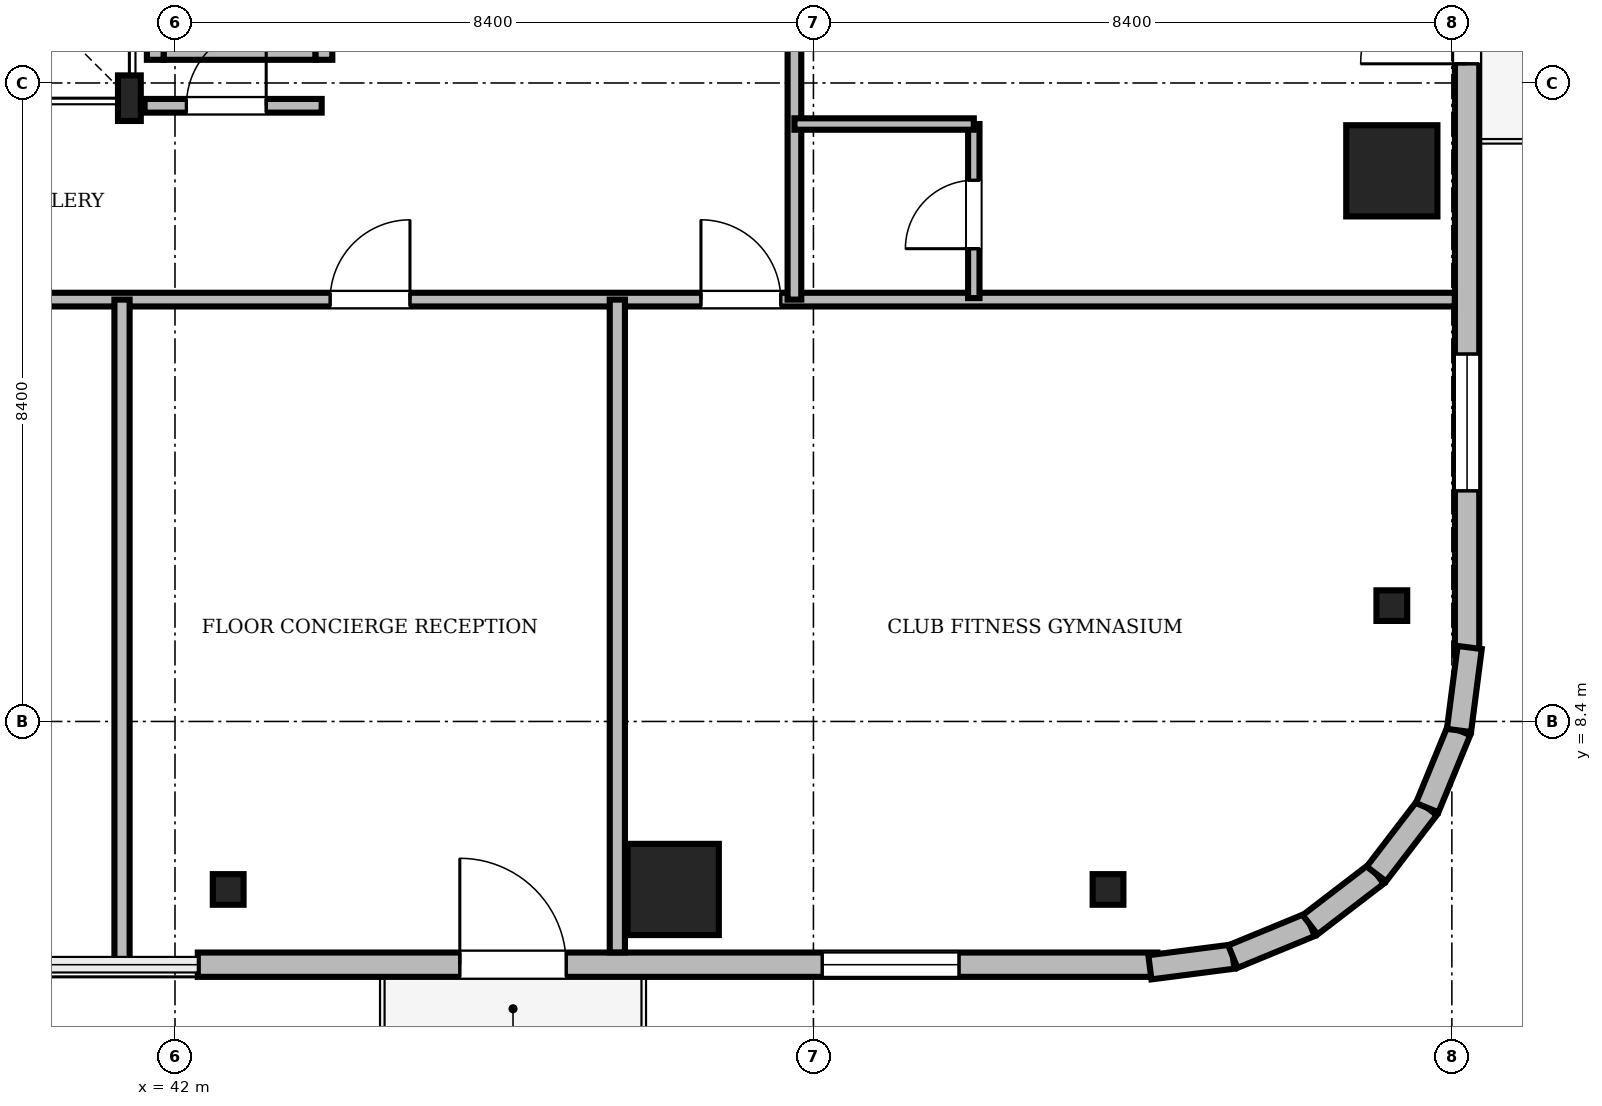
"""IFC4 building model, lengths in metres.
Left out: names, types, materials, properties, quantities, classifications, styles, units other than length and angle.
Written with IfcOpenShell. Run it as: python <this file> out.ifc"""

import sys

from ifc_helpers import new_model, si_unit, direction, frame, frame_2d, origin, origin_2d, place, context, subcontext, project, spatial, rectangle, i_section, extrude, source, transform, mapped, element, fill, save


model = new_model("IFC4")
c1 = context("Model", 3, precision=1e-05, world=origin(), true_north=direction((0.0, 1.0)))
c2 = subcontext(c1, "Body", "Model", "MODEL_VIEW")
j1 = project(units=[si_unit("LENGTHUNIT", "METRE"), si_unit("PLANEANGLEUNIT", "RADIAN")], contexts=[c1])
p1 = place(None, origin())
s1 = spatial("IfcSite", under=j1, at=p1, CompositionType="ELEMENT")
p2 = place(p1, origin())
s2 = spatial("IfcBuilding", under=s1, at=p2, CompositionType="ELEMENT")
p3 = place(p2, frame((0.0, 0.0, 278.25)))
s3 = spatial("IfcBuildingStorey", under=s2, at=p3, CompositionType="ELEMENT", Elevation=278.25)
m1 = source(origin(), c2, "Body", "SweptSolid", [
    extrude(i_section(OverallWidth=0.3, OverallDepth=0.6, WebThickness=0.015, FlangeThickness=0.03, FilletRadius=0.027, at=origin_2d()), origin(), (0.0, 0.0, 1.0), 3.3),
])
p4 = place(p3, frame((41.4, 16.6, 0.0), z_axis=(0.0, 0.0, 1.0), x_axis=(1.0, 0.0, 0.0)))
e1 = element("IfcColumn", 1, at=p4, inside=s3, PredefinedType="COLUMN", context=c2, shape_type="MappedRepresentation", body=[
    mapped(m1, transform((0.0, 0.0, 0.0), scale=1.0)),
])
m2 = source(origin(), c2, "Body", "SweptSolid", [
    extrude(rectangle(XDim=1.2, YDim=1.2, at=origin_2d()), origin(), (0.0, 0.0, 1.0), 3.354),
])
for number, where, z_axis, x_axis in (
    (2, (48.556, 6.19, 0.0), (-0.076, 0.161, 0.984), (-0.904, -0.428, 0.0)),
    (3, (58.01, 15.644, 0.0), (-0.161, 0.076, 0.984), (-0.428, -0.904, 0.0)),
):
    element("IfcColumn", number, at=place(p3, frame(where, z_axis=z_axis, x_axis=x_axis)), inside=s3, PredefinedType="COLUMN", context=c2, shape_type="MappedRepresentation", body=[
        mapped(m2, transform((0.0, 0.0, 0.0), scale=1.0)),
    ])
m3 = source(origin(), c2, "Body", "SweptSolid", [
    extrude(i_section(OverallWidth=0.405, OverallDepth=0.403, WebThickness=0.018, FlangeThickness=0.028, FilletRadius=0.015, at=origin_2d()), origin(), (0.0, 0.0, 1.0), 3.344),
])
p5 = place(p3, frame((42.7, 6.19, 0.0), z_axis=(0.0, 0.161497617931, 0.986873101975), x_axis=(-1.0, 0.0, 0.0)))
e4 = element("IfcColumn", 4, at=p5, inside=s3, PredefinedType="COLUMN", context=c2, shape_type="MappedRepresentation", body=[
    mapped(m3, transform((0.0, 0.0, 0.0), scale=1.0)),
])
m4 = source(origin(), c2, "Body", "SweptSolid", [
    extrude(i_section(OverallWidth=0.405, OverallDepth=0.403, WebThickness=0.018, FlangeThickness=0.028, FilletRadius=0.015, at=origin_2d()), origin(), (0.0, 0.0, 1.0), 3.371),
])
p6 = place(p3, frame((54.276, 6.19, 0.0), z_axis=(-0.126309254806, 0.160204169513, 0.97896914978), x_axis=(-0.785282442908, -0.619137694589, 0.0)))
e5 = element("IfcColumn", 5, at=p6, inside=s3, PredefinedType="COLUMN", context=c2, shape_type="MappedRepresentation", body=[
    mapped(m4, transform((0.0, 0.0, 0.0), scale=1.0)),
])
m5 = source(origin(), c2, "Body", "SweptSolid", [
    extrude(i_section(OverallWidth=0.405, OverallDepth=0.403, WebThickness=0.018, FlangeThickness=0.028, FilletRadius=0.015, at=origin_2d()), origin(), (0.0, 0.0, 1.0), 3.371),
])
p7 = place(p3, frame((58.01, 9.924, 0.0), z_axis=(-0.160202703573, 0.126380523389, 0.978960191773), x_axis=(-0.619356546002, -0.785109845133, 0.0)))
e6 = element("IfcColumn", 6, at=p7, inside=s3, PredefinedType="COLUMN", context=c2, shape_type="MappedRepresentation", body=[
    mapped(m5, transform((0.0, 0.0, 0.0), scale=1.0)),
])
m6 = source(origin(), c2, "Body", "SweptSolid", [
    extrude(rectangle(XDim=12.626, YDim=0.32, at=frame_2d((6.313, 0.0))), origin(), (0.0, 0.0, 1.0), 3.3),
])
p8 = place(p3, frame((42.3, 5.2, 0.0), z_axis=(0.0, 0.0, 1.0), x_axis=(1.0, 0.0, 0.0)))
e7 = element("IfcWall", 7, at=p8, inside=s3, PredefinedType="SOLIDWALL", context=c2, shape_type="MappedRepresentation", body=[
    mapped(m6, transform((0.0, 0.0, 0.0), scale=1.0)),
])
m7 = source(origin(), c2, "Body", "SweptSolid", [
    extrude(rectangle(XDim=1.4, YDim=2.3, at=frame_2d((0.7, 1.15))), frame((0.0, 0.17, 0.0), z_axis=(0.0, -1.0, 0.0), x_axis=(1.0, 0.0, 0.0)), (0.0, 0.0, 1.0), 0.34),
])
p9 = place(p8, frame((3.448, 0.0, 0.0)))
e8 = element("IfcOpeningElement", 8, at=p9, cuts=e7, PredefinedType="OPENING", context=c2, shape_type="MappedRepresentation", body=[
    mapped(m7, transform((0.0, 0.0, 0.0), scale=1.0)),
])
m8 = source(origin(), c2, "Body", "SweptSolid", [
    extrude(rectangle(XDim=1.8, YDim=2.4, at=frame_2d((0.9, 1.2))), frame((0.0, 0.17, 0.0), z_axis=(0.0, -1.0, 0.0), x_axis=(1.0, 0.0, 0.0)), (0.0, 0.0, 1.0), 0.34),
])
p10 = place(p8, frame((8.216, 0.0, 0.64)))
e9 = element("IfcOpeningElement", 9, at=p10, cuts=e7, PredefinedType="OPENING", context=c2, shape_type="MappedRepresentation", body=[
    mapped(m8, transform((0.0, 0.0, 0.0), scale=1.0)),
])
p11 = place(p3, frame((59.0, 9.274, 0.0), z_axis=(0.0, 0.0, 1.0), x_axis=(0.0, 1.0, 0.0)))
e10 = element("IfcWall", 10, at=p11, inside=s3, PredefinedType="SOLIDWALL", context=c2, shape_type="MappedRepresentation", body=[
    mapped(m6, transform((0.0, 0.0, 0.0), scale=1.0)),
])
p12 = place(p11, frame((7.778, 0.0, 0.0)))
e11 = element("IfcOpeningElement", 11, at=p12, cuts=e10, PredefinedType="OPENING", context=c2, shape_type="MappedRepresentation", body=[
    mapped(m7, transform((0.0, 0.0, 0.0), scale=1.0)),
])
p13 = place(p11, frame((2.16, 0.0, 0.64)))
e12 = element("IfcOpeningElement", 12, at=p13, cuts=e10, PredefinedType="OPENING", context=c2, shape_type="MappedRepresentation", body=[
    mapped(m8, transform((0.0, 0.0, 0.0), scale=1.0)),
])
m9 = source(origin(), c2, "Body", "SweptSolid", [
    extrude(rectangle(XDim=1.1, YDim=0.32, at=frame_2d((0.55, 0.0))), origin(), (0.0, 0.0, 1.0), 3.3),
])
p14 = place(p3, frame((54.827, 5.166, 0.0), z_axis=(0.0, 0.0, 1.0), x_axis=(0.991799654079, 0.127802371532, 0.0)))
e13 = element("IfcWall", 13, at=p14, inside=s3, PredefinedType="SOLIDWALL", context=c2, shape_type="MappedRepresentation", body=[
    mapped(m9, transform((0.0, 0.0, 0.0), scale=1.0)),
])
m10 = source(origin(), c2, "Body", "SweptSolid", [
    extrude(rectangle(XDim=1.099, YDim=0.32, at=frame_2d((0.55, 0.0))), origin(), (0.0, 0.0, 1.0), 3.3),
])
p15 = place(p3, frame((55.918, 5.306, 0.0), z_axis=(0.0, 0.0, 1.0), x_axis=(0.924613688598, 0.380906191676, 0.0)))
e14 = element("IfcWall", 14, at=p15, inside=s3, PredefinedType="SOLIDWALL", context=c2, shape_type="MappedRepresentation", body=[
    mapped(m10, transform((0.0, 0.0, 0.0), scale=1.0)),
])
m11 = source(origin(), c2, "Body", "SweptSolid", [
    extrude(rectangle(XDim=1.099, YDim=0.32, at=frame_2d((0.549, 0.0))), origin(), (0.0, 0.0, 1.0), 3.3),
])
for number, where, z_axis, x_axis in (
    (15, (56.935, 5.725, 0.0), (0.0, 0.0, 1.0), (0.794, 0.608, 0.0)),
    (16, (57.807, 6.393, 0.0), (0.0, 0.0, 1.0), (0.608, 0.794, 0.0)),
):
    element("IfcWall", number, at=place(p3, frame(where, z_axis=z_axis, x_axis=x_axis)), inside=s3, PredefinedType="SOLIDWALL", context=c2, shape_type="MappedRepresentation", body=[
        mapped(m11, transform((0.0, 0.0, 0.0), scale=1.0)),
    ])
p16 = place(p3, frame((58.475, 7.265, 0.0), z_axis=(0.0, 0.0, 1.0), x_axis=(0.380906191676, 0.924613688598, 0.0)))
e17 = element("IfcWall", 17, at=p16, inside=s3, PredefinedType="SOLIDWALL", context=c2, shape_type="MappedRepresentation", body=[
    mapped(m10, transform((0.0, 0.0, 0.0), scale=1.0)),
])
m12 = source(origin(), c2, "Body", "SweptSolid", [
    extrude(rectangle(XDim=1.101, YDim=0.32, at=frame_2d((0.55, 0.0))), origin(), (0.0, 0.0, 1.0), 3.3),
])
p17 = place(p3, frame((58.894, 8.282, 0.0), z_axis=(0.0, 0.0, 1.0), x_axis=(0.127774253526, 0.991803276933, 0.0)))
e18 = element("IfcWall", 18, at=p17, inside=s3, PredefinedType="SOLIDWALL", context=c2, shape_type="MappedRepresentation", body=[
    mapped(m12, transform((0.0, 0.0, 0.0), scale=1.0)),
])
m13 = source(origin(), c2, "Body", "SweptSolid", [
    extrude(rectangle(XDim=2.0, YDim=0.22, at=frame_2d((1.0, 0.0))), origin(), (0.0, 0.0, 1.0), 3.3),
])
p18 = place(p3, frame((41.85, 17.215, 0.0), z_axis=(0.0, 0.0, 1.0), x_axis=(1.0, 0.0, 0.0)))
e19 = element("IfcWall", 19, at=p18, inside=s3, PredefinedType="SOLIDWALL", context=c2, shape_type="MappedRepresentation", body=[
    mapped(m13, transform((0.0, 0.0, 0.0), scale=1.0)),
])
m14 = source(origin(), c2, "Body", "SweptSolid", [
    extrude(rectangle(XDim=2.19, YDim=0.22, at=frame_2d((1.095, 0.0))), origin(), (0.0, 0.0, 1.0), 3.3),
])
p19 = place(p3, frame((41.74, 17.105, 0.0), z_axis=(0.0, 0.0, 1.0), x_axis=(0.0, 1.0, 0.0)))
e20 = element("IfcWall", 20, at=p19, inside=s3, PredefinedType="SOLIDWALL", context=c2, shape_type="MappedRepresentation", body=[
    mapped(m14, transform((0.0, 0.0, 0.0), scale=1.0)),
])
p20 = place(p3, frame((43.96, 17.105, 0.0), z_axis=(0.0, 0.0, 1.0), x_axis=(0.0, 1.0, 0.0)))
e21 = element("IfcWall", 21, at=p20, inside=s3, PredefinedType="SOLIDWALL", context=c2, shape_type="MappedRepresentation", body=[
    mapped(m14, transform((0.0, 0.0, 0.0), scale=1.0)),
])
m15 = source(origin(), c2, "Body", "SweptSolid", [
    extrude(rectangle(XDim=1.1, YDim=2.2, at=frame_2d((0.55, 1.1))), frame((0.0, 0.12, 0.0), z_axis=(0.0, -1.0, 0.0), x_axis=(1.0, 0.0, 0.0)), (0.0, 0.0, 1.0), 0.24),
])
p21 = place(p20, frame((0.545, 0.0, 0.0)))
e22 = element("IfcOpeningElement", 22, at=p21, cuts=e21, PredefinedType="OPENING", context=c2, shape_type="MappedRepresentation", body=[
    mapped(m15, transform((0.0, 0.0, 0.0), scale=1.0)),
])
m16 = source(origin(), c2, "Body", "SweptSolid", [
    extrude(rectangle(XDim=39.676, YDim=0.18, at=frame_2d((19.838, 0.0))), origin(), (0.0, 0.0, 1.0), 2.08),
])
p22 = place(p3, frame((19.162, 13.95, 0.0), z_axis=(0.0, 0.0, 1.0), x_axis=(1.0, 0.0, 0.0)))
e23 = element("IfcWall", 23, at=p22, inside=s3, PredefinedType="PARTITIONING", context=c2, shape_type="MappedRepresentation", body=[
    mapped(m16, transform((0.0, 0.0, 0.0), scale=1.0)),
])
m17 = source(origin(), c2, "Body", "SweptSolid", [
    extrude(rectangle(XDim=1.05, YDim=2.2, at=frame_2d((0.525, 1.1))), frame((0.0, 0.1, 0.0), z_axis=(0.0, -1.0, 0.0), x_axis=(1.0, 0.0, 0.0)), (0.0, 0.0, 1.0), 0.2),
])
p23 = place(p22, frame((7.758, 0.0, 0.0)))
e24 = element("IfcOpeningElement", 24, at=p23, cuts=e23, PredefinedType="OPENING", context=c2, shape_type="MappedRepresentation", body=[
    mapped(m17, transform((0.0, 0.0, 0.0), scale=1.0)),
])
p24 = place(p22, frame((11.846, 0.0, 0.0)))
e25 = element("IfcOpeningElement", 25, at=p24, cuts=e23, PredefinedType="OPENING", context=c2, shape_type="MappedRepresentation", body=[
    mapped(m17, transform((0.0, 0.0, 0.0), scale=1.0)),
])
p25 = place(p22, frame((18.363, 0.0, 0.0)))
e26 = element("IfcOpeningElement", 26, at=p25, cuts=e23, PredefinedType="OPENING", context=c2, shape_type="MappedRepresentation", body=[
    mapped(m17, transform((0.0, 0.0, 0.0), scale=1.0)),
])
p26 = place(p22, frame((24.88, 0.0, 0.0)))
e27 = element("IfcOpeningElement", 27, at=p26, cuts=e23, PredefinedType="OPENING", context=c2, shape_type="MappedRepresentation", body=[
    mapped(m17, transform((0.0, 0.0, 0.0), scale=1.0)),
])
p27 = place(p22, frame((29.758, 0.0, 0.0)))
e28 = element("IfcOpeningElement", 28, at=p27, cuts=e23, PredefinedType="OPENING", context=c2, shape_type="MappedRepresentation", body=[
    mapped(m17, transform((0.0, 0.0, 0.0), scale=1.0)),
])
m18 = source(origin(), c2, "Body", "SweptSolid", [
    extrude(rectangle(XDim=27.15, YDim=0.18, at=frame_2d((13.575, 0.0))), origin(), (0.0, 0.0, 1.0), 2.742),
])
p28 = place(p3, frame((50.15, 13.95, 0.0), z_axis=(0.0, 0.0, 1.0), x_axis=(0.0, 1.0, 0.0)))
e29 = element("IfcWall", 29, at=p28, inside=s3, PredefinedType="PARTITIONING", context=c2, shape_type="MappedRepresentation", body=[
    mapped(m18, transform((0.0, 0.0, 0.0), scale=1.0)),
])
p29 = place(p28, frame((5.153, 0.0, 0.0)))
e30 = element("IfcOpeningElement", 30, at=p29, cuts=e29, PredefinedType="OPENING", context=c2, shape_type="MappedRepresentation", body=[
    mapped(m17, transform((0.0, 0.0, 0.0), scale=1.0)),
])
p30 = place(p28, frame((14.13, 0.0, 0.0)))
e31 = element("IfcOpeningElement", 31, at=p30, cuts=e29, PredefinedType="OPENING", context=c2, shape_type="MappedRepresentation", body=[
    mapped(m17, transform((0.0, 0.0, 0.0), scale=1.0)),
])
p31 = place(p28, frame((23.107, 0.0, 0.0)))
e32 = element("IfcOpeningElement", 32, at=p31, cuts=e29, PredefinedType="OPENING", context=c2, shape_type="MappedRepresentation", body=[
    mapped(m17, transform((0.0, 0.0, 0.0), scale=1.0)),
])
m19 = source(origin(), c2, "Body", "SweptSolid", [
    extrude(rectangle(XDim=2.33, YDim=0.18, at=frame_2d((1.165, 0.0))), origin(), (0.0, 0.0, 1.0), 2.742),
])
p32 = place(p3, frame((41.6, 16.5, 0.0), z_axis=(0.0, 0.0, 1.0), x_axis=(1.0, 0.0, 0.0)))
e33 = element("IfcWall", 33, at=p32, inside=s3, PredefinedType="PARTITIONING", context=c2, shape_type="MappedRepresentation", body=[
    mapped(m19, transform((0.0, 0.0, 0.0), scale=1.0)),
])
p33 = place(p32, frame((0.55, 0.0, 0.0)))
e34 = element("IfcOpeningElement", 34, at=p33, cuts=e33, PredefinedType="OPENING", context=c2, shape_type="MappedRepresentation", body=[
    mapped(m17, transform((0.0, 0.0, 0.0), scale=1.0)),
])
m20 = source(origin(), c2, "Body", "SweptSolid", [
    extrude(rectangle(XDim=2.29, YDim=0.15, at=frame_2d((1.145, 0.0))), origin(), (0.0, 0.0, 1.0), 2.742),
])
p34 = place(p3, frame((52.51, 13.97, 0.0), z_axis=(0.0, 0.0, 1.0), x_axis=(0.0, 1.0, 0.0)))
e35 = element("IfcWall", 35, at=p34, inside=s3, PredefinedType="PARTITIONING", context=c2, shape_type="MappedRepresentation", body=[
    mapped(m20, transform((0.0, 0.0, 0.0), scale=1.0)),
])
m21 = source(origin(), c2, "Body", "SweptSolid", [
    extrude(rectangle(XDim=0.9, YDim=2.1, at=frame_2d((0.45, 1.05))), frame((0.0, 0.085, 0.0), z_axis=(0.0, -1.0, 0.0), x_axis=(1.0, 0.0, 0.0)), (0.0, 0.0, 1.0), 0.17),
])
p35 = place(p34, frame((0.65, 0.0, 0.0)))
e36 = element("IfcOpeningElement", 36, at=p35, cuts=e35, PredefinedType="OPENING", context=c2, shape_type="MappedRepresentation", body=[
    mapped(m21, transform((0.0, 0.0, 0.0), scale=1.0)),
])
m22 = source(origin(), c2, "Body", "SweptSolid", [
    extrude(rectangle(XDim=8.78, YDim=0.2, at=frame_2d((4.39, 0.0))), origin(), (0.0, 0.0, 1.0), 2.08),
])
p36 = place(p3, frame((41.303, 5.17, 0.0), z_axis=(0.0, 0.0, 1.0), x_axis=(0.0, 1.0, 0.0)))
e37 = element("IfcWall", 37, at=p36, inside=s3, PredefinedType="PARTITIONING", context=c2, shape_type="MappedRepresentation", body=[
    mapped(m22, transform((0.0, 0.0, 0.0), scale=1.0)),
])
m23 = source(origin(), c2, "Body", "SweptSolid", [
    extrude(rectangle(XDim=8.588, YDim=0.2, at=frame_2d((4.294, 0.0))), origin(), (0.0, 0.0, 1.0), 2.08),
])
p37 = place(p3, frame((47.82, 5.362, 0.0), z_axis=(0.0, 0.0, 1.0), x_axis=(0.0, 1.0, 0.0)))
e38 = element("IfcWall", 38, at=p37, inside=s3, PredefinedType="PARTITIONING", context=c2, shape_type="MappedRepresentation", body=[
    mapped(m23, transform((0.0, 0.0, 0.0), scale=1.0)),
])
m24 = source(origin(), c2, "Body", "SweptSolid", [
    extrude(rectangle(XDim=2.36, YDim=0.15, at=frame_2d((1.18, 0.0))), origin(), (0.0, 0.0, 1.0), 2.742),
])
p38 = place(p3, frame((50.15, 16.26, 0.0), z_axis=(0.0, 0.0, 1.0), x_axis=(1.0, 0.0, 0.0)))
e39 = element("IfcWall", 39, at=p38, inside=s3, PredefinedType="PARTITIONING", context=c2, shape_type="MappedRepresentation", body=[
    mapped(m24, transform((0.0, 0.0, 0.0), scale=1.0)),
])
m25 = source(origin(), c2, "Body", "SweptSolid", [
    extrude(rectangle(XDim=1.4, YDim=2.3, at=frame_2d((0.7, 1.15))), frame((0.0, 0.025, 0.0), z_axis=(0.0, -1.0, 0.0), x_axis=(1.0, 0.0, 0.0)), (0.0, 0.0, 1.0), 0.05),
])
p39 = place(p9, frame((1.4, 0.0, 0.0), z_axis=(0.0, 0.0, 1.0), x_axis=(-1.0, 0.0, 0.0)))
e40 = element("IfcDoor", 40, at=p39, inside=s3, OperationType="DOUBLE_DOOR_SLIDING", PredefinedType="DOOR", context=c2, shape_type="MappedRepresentation", body=[
    mapped(m25, transform((0.0, 0.0, 0.0), scale=1.0)),
])
fill(e8, e40)
m26 = source(origin(), c2, "Body", "SweptSolid", [
    extrude(rectangle(XDim=1.8, YDim=2.4, at=frame_2d((0.9, 1.2))), frame((0.0, 0.03, 0.0), z_axis=(0.0, -1.0, 0.0), x_axis=(1.0, 0.0, 0.0)), (0.0, 0.0, 1.0), 0.06),
])
p40 = place(p10, origin())
e41 = element("IfcWindow", 41, at=p40, inside=s3, PartitioningType="SINGLE_PANEL", PredefinedType="WINDOW", context=c2, shape_type="MappedRepresentation", body=[
    mapped(m26, transform((0.0, 0.0, 0.0), scale=1.0)),
])
fill(e9, e41)
p41 = place(p12, frame((1.4, 0.0, 0.0), z_axis=(0.0, 0.0, 1.0), x_axis=(-1.0, 0.0, 0.0)))
e42 = element("IfcDoor", 42, at=p41, inside=s3, OperationType="DOUBLE_DOOR_SLIDING", PredefinedType="DOOR", context=c2, shape_type="MappedRepresentation", body=[
    mapped(m25, transform((0.0, 0.0, 0.0), scale=1.0)),
])
fill(e11, e42)
p42 = place(p13, origin())
e43 = element("IfcWindow", 43, at=p42, inside=s3, PartitioningType="SINGLE_PANEL", PredefinedType="WINDOW", context=c2, shape_type="MappedRepresentation", body=[
    mapped(m26, transform((0.0, 0.0, 0.0), scale=1.0)),
])
fill(e12, e43)
m27 = source(origin(), c2, "Body", "SweptSolid", [
    extrude(rectangle(XDim=1.05, YDim=2.2, at=frame_2d((0.525, 1.1))), frame((0.0, 0.025, 0.0), z_axis=(0.0, -1.0, 0.0), x_axis=(1.0, 0.0, 0.0)), (0.0, 0.0, 1.0), 0.05),
])
p43 = place(p26, origin())
e44 = element("IfcDoor", 44, at=p43, inside=s3, OperationType="SINGLE_SWING_RIGHT", PredefinedType="DOOR", context=c2, shape_type="MappedRepresentation", body=[
    mapped(m27, transform((0.0, 0.0, 0.0), scale=1.0)),
])
fill(e27, e44)
p44 = place(p27, origin())
e45 = element("IfcDoor", 45, at=p44, inside=s3, OperationType="SINGLE_SWING_LEFT", PredefinedType="DOOR", context=c2, shape_type="MappedRepresentation", body=[
    mapped(m27, transform((0.0, 0.0, 0.0), scale=1.0)),
])
fill(e28, e45)
p45 = place(p33, origin())
e46 = element("IfcDoor", 46, at=p45, inside=s3, OperationType="SINGLE_SWING_RIGHT", PredefinedType="DOOR", context=c2, shape_type="MappedRepresentation", body=[
    mapped(m27, transform((0.0, 0.0, 0.0), scale=1.0)),
])
fill(e34, e46)
m28 = source(origin(), c2, "Body", "SweptSolid", [
    extrude(rectangle(XDim=0.9, YDim=2.1, at=frame_2d((0.45, 1.05))), frame((0.0, 0.025, 0.0), z_axis=(0.0, -1.0, 0.0), x_axis=(1.0, 0.0, 0.0)), (0.0, 0.0, 1.0), 0.05),
])
p46 = place(p35, origin())
e47 = element("IfcDoor", 47, at=p46, inside=s3, OperationType="SINGLE_SWING_LEFT", PredefinedType="DOOR", context=c2, shape_type="MappedRepresentation", body=[
    mapped(m28, transform((0.0, 0.0, 0.0), scale=1.0)),
])
fill(e36, e47)
save(model, sys.argv[1])
